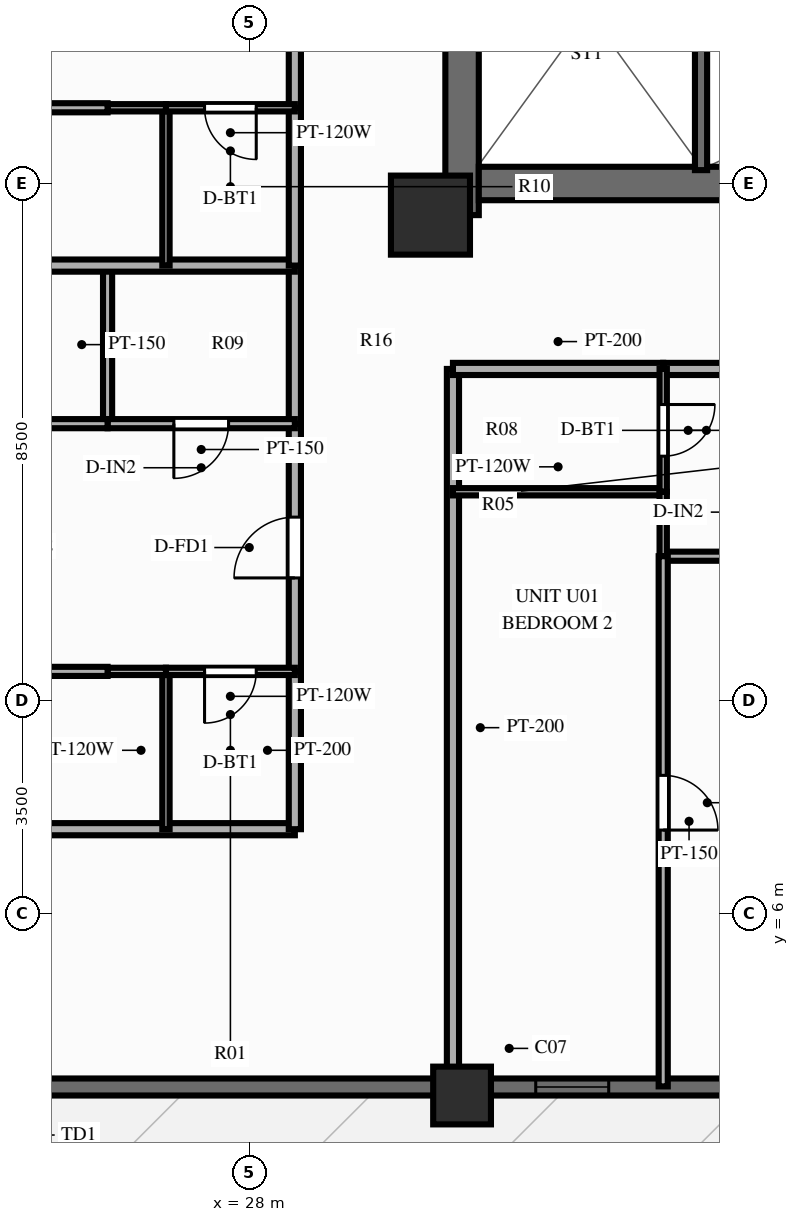
"""IFC4 building model, lengths in metres.
Left out: names, types, materials, properties, quantities, classifications, styles, units other than length and angle.
Written with IfcOpenShell. Run it as: python <this file> out.ifc"""

import sys

from ifc_helpers import new_model, si_unit, direction, frame, frame_2d, origin, origin_2d, place, context, subcontext, project, spatial, rectangle, extrude, source, transform, mapped, element, fill, save


model = new_model("IFC4")
c1 = context("Model", 3, precision=1e-05, world=origin(), true_north=direction((0.0, 1.0)))
c2 = subcontext(c1, "Body", "Model", "MODEL_VIEW")
j1 = project(units=[si_unit("LENGTHUNIT", "METRE"), si_unit("PLANEANGLEUNIT", "RADIAN")], contexts=[c1])
p1 = place(None, origin())
s1 = spatial("IfcSite", under=j1, at=p1, CompositionType="ELEMENT")
p2 = place(p1, origin())
s2 = spatial("IfcBuilding", under=s1, at=p2, CompositionType="ELEMENT")
p3 = place(p2, frame((0.0, 0.0, 119.85)))
s3 = spatial("IfcBuildingStorey", under=s2, at=p3, CompositionType="ELEMENT", Elevation=119.85)
p4 = place(p3, frame((31.5, 17.48, 0.0), z_axis=(0.0, 0.0, 1.0), x_axis=(0.0, 1.0, 0.0)))
e1 = element("IfcWall", 1, at=p4, inside=s3, PredefinedType="SHEAR", context=c2, shape_type="SweptSolid", body=[
    extrude(rectangle(XDim=19.04, YDim=0.55, at=frame_2d((9.52, 0.0))), origin(), (0.0, 0.0, 1.0), 3.0),
])
p5 = place(p4, frame((6.32, 0.0, 0.0)))
e2 = element("IfcOpeningElement", 2, at=p5, cuts=e1, PredefinedType="OPENING", context=c2, shape_type="SweptSolid", body=[
    extrude(rectangle(XDim=1.1, YDim=2.15, at=frame_2d((0.55, 1.075))), frame((0.0, 0.287, 0.0), z_axis=(0.0, -1.0, 0.0), x_axis=(1.0, 0.0, 0.0)), (0.0, 0.0, 1.0), 0.574),
])
p6 = place(p3, frame((31.775, 18.0, 0.0), z_axis=(0.0, 0.0, 1.0), x_axis=(1.0, 0.0, 0.0)))
e3 = element("IfcWall", 3, at=p6, inside=s3, PredefinedType="SHEAR", context=c2, shape_type="SweptSolid", body=[
    extrude(rectangle(XDim=12.45, YDim=0.55, at=frame_2d((6.225, 0.0))), origin(), (0.0, 0.0, 1.0), 3.0),
])
m1 = source(origin(), c2, "Body", "SweptSolid", [
    extrude(rectangle(XDim=1.3, YDim=1.3, at=origin_2d()), origin(), (0.0, 0.0, 1.0), 3.0),
])
p7 = place(p3, frame((30.98, 17.48, 0.0), z_axis=(0.0, 0.0, 1.0), x_axis=(1.0, 0.0, 0.0)))
e4 = element("IfcColumn", 4, at=p7, inside=s3, PredefinedType="COLUMN", context=c2, shape_type="MappedRepresentation", body=[
    mapped(m1, transform((0.0, 0.0, 0.0), scale=1.0)),
])
m2 = source(origin(), c2, "Body", "SweptSolid", [
    extrude(rectangle(XDim=0.95, YDim=0.95, at=origin_2d()), origin(), (0.0, 0.0, 1.0), 3.0),
])
p8 = place(p3, frame((31.5, 3.0, 0.0), z_axis=(0.0, 0.0, 1.0), x_axis=(1.0, 0.0, 0.0)))
e5 = element("IfcColumn", 5, at=p8, inside=s3, PredefinedType="COLUMN", context=c2, shape_type="MappedRepresentation", body=[
    mapped(m2, transform((0.0, 0.0, 0.0), scale=1.0)),
])
p9 = place(p3, frame((16.2, 3.14, 0.0), z_axis=(0.0, 0.0, 1.0), x_axis=(1.0, 0.0, 0.0)))
e6 = element("IfcWall", 6, at=p9, inside=s3, PredefinedType="SOLIDWALL", context=c2, shape_type="SweptSolid", body=[
    extrude(rectangle(XDim=43.6, YDim=0.28, at=frame_2d((21.8, 0.0))), origin(), (0.0, 0.0, 1.0), 2.28),
])
p10 = place(p9, frame((8.2, 0.0, 0.0), z_axis=(0.0, 0.0, 1.0), x_axis=(-1.0, 0.0, 0.0)))
e7 = element("IfcOpeningElement", 7, at=p10, cuts=e6, PredefinedType="OPENING", context=c2, shape_type="SweptSolid", body=[
    extrude(rectangle(XDim=1.1, YDim=2.15, at=frame_2d((0.55, 1.075))), frame((0.0, 0.152, 0.0), z_axis=(0.0, -1.0, 0.0), x_axis=(1.0, 0.0, 0.0)), (0.0, 0.0, 1.0), 0.304),
])
p11 = place(p9, frame((16.511, 0.0, 0.25)))
e8 = element("IfcOpeningElement", 8, at=p11, cuts=e6, PredefinedType="OPENING", context=c2, shape_type="SweptSolid", body=[
    extrude(rectangle(XDim=1.2, YDim=1.5, at=frame_2d((0.6, 0.75))), frame((0.0, 0.152, 0.0), z_axis=(0.0, -1.0, 0.0), x_axis=(1.0, 0.0, 0.0)), (0.0, 0.0, 1.0), 0.304),
])
p12 = place(p9, frame((21.065, 0.0, 0.25)))
e9 = element("IfcOpeningElement", 9, at=p12, cuts=e6, PredefinedType="OPENING", context=c2, shape_type="SweptSolid", body=[
    extrude(rectangle(XDim=1.2, YDim=1.5, at=frame_2d((0.6, 0.75))), frame((0.0, 0.152, 0.0), z_axis=(0.0, -1.0, 0.0), x_axis=(1.0, 0.0, 0.0)), (0.0, 0.0, 1.0), 0.304),
])
p13 = place(p9, frame((25.754, 0.0, 0.25)))
e10 = element("IfcOpeningElement", 10, at=p13, cuts=e6, PredefinedType="OPENING", context=c2, shape_type="SweptSolid", body=[
    extrude(rectangle(XDim=1.2, YDim=1.5, at=frame_2d((0.6, 0.75))), frame((0.0, 0.152, 0.0), z_axis=(0.0, -1.0, 0.0), x_axis=(1.0, 0.0, 0.0)), (0.0, 0.0, 1.0), 0.304),
])
p14 = place(p9, frame((35.35, 0.0, 0.25)))
e11 = element("IfcOpeningElement", 11, at=p14, cuts=e6, PredefinedType="OPENING", context=c2, shape_type="SweptSolid", body=[
    extrude(rectangle(XDim=1.2, YDim=1.5, at=frame_2d((0.6, 0.75))), frame((0.0, 0.152, 0.0), z_axis=(0.0, -1.0, 0.0), x_axis=(1.0, 0.0, 0.0)), (0.0, 0.0, 1.0), 0.304),
])
p15 = place(p3, frame((35.43, 18.22, 0.0), z_axis=(0.0, 0.0, 1.0), x_axis=(0.0, 1.0, 0.0)))
e12 = element("IfcWall", 12, at=p15, inside=s3, PredefinedType="SOLIDWALL", context=c2, shape_type="SweptSolid", body=[
    extrude(rectangle(XDim=7.22, YDim=0.2, at=frame_2d((3.61, 0.0))), origin(), (0.0, 0.0, 1.0), 2.79),
])
p16 = place(p15, frame((6.68, 0.0, 0.0), z_axis=(0.0, 0.0, 1.0), x_axis=(-1.0, 0.0, 0.0)))
e13 = element("IfcOpeningElement", 13, at=p16, cuts=e12, PredefinedType="OPENING", context=c2, shape_type="SweptSolid", body=[
    extrude(rectangle(XDim=1.1, YDim=2.15, at=frame_2d((0.55, 1.075))), frame((0.0, 0.112, 0.0), z_axis=(0.0, -1.0, 0.0), x_axis=(1.0, 0.0, 0.0)), (0.0, 0.0, 1.0), 0.224),
])
p17 = place(p3, frame((31.35, 14.95, 0.0), z_axis=(0.0, 0.0, 1.0), x_axis=(0.0, -1.0, 0.0)))
e14 = element("IfcWall", 14, at=p17, inside=s3, PredefinedType="PARTITIONING", context=c2, shape_type="SweptSolid", body=[
    extrude(rectangle(XDim=11.8, YDim=0.2, at=frame_2d((5.9, 0.0))), origin(), (0.0, 0.0, 1.0), 2.34),
])
p18 = place(p3, frame((31.35, 14.95, 0.0), z_axis=(0.0, 0.0, 1.0), x_axis=(1.0, 0.0, 0.0)))
e15 = element("IfcWall", 15, at=p18, inside=s3, PredefinedType="PARTITIONING", context=c2, shape_type="SweptSolid", body=[
    extrude(rectangle(XDim=3.458, YDim=0.2, at=frame_2d((1.729, 0.0))), origin(), (0.0, 0.0, 1.0), 2.79),
])
p19 = place(p3, frame((34.808, 14.95, 0.0), z_axis=(0.0, 0.0, 1.0), x_axis=(1.0, 0.0, 0.0)))
e16 = element("IfcWall", 16, at=p19, inside=s3, PredefinedType="PARTITIONING", context=c2, shape_type="SweptSolid", body=[
    extrude(rectangle(XDim=3.465, YDim=0.2, at=frame_2d((1.732, 0.0))), origin(), (0.0, 0.0, 1.0), 2.79),
])
p20 = place(p19, frame((1.232, 0.0, 0.0)))
e17 = element("IfcOpeningElement", 17, at=p20, cuts=e16, PredefinedType="OPENING", context=c2, shape_type="SweptSolid", body=[
    extrude(rectangle(XDim=1.0, YDim=2.15, at=frame_2d((0.5, 1.075))), frame((0.0, 0.112, 0.0), z_axis=(0.0, -1.0, 0.0), x_axis=(1.0, 0.0, 0.0)), (0.0, 0.0, 1.0), 0.224),
])
p21 = place(p3, frame((34.808, 11.87, 0.0), z_axis=(0.0, 0.0, 1.0), x_axis=(1.0, 0.0, 0.0)))
e18 = element("IfcWall", 18, at=p21, inside=s3, PredefinedType="PARTITIONING", context=c2, shape_type="SweptSolid", body=[
    extrude(rectangle(XDim=3.465, YDim=0.15, at=frame_2d((1.732, 0.0))), origin(), (0.0, 0.0, 1.0), 2.79),
])
p22 = place(p21, frame((1.282, 0.0, 0.0)))
e19 = element("IfcOpeningElement", 19, at=p22, cuts=e18, PredefinedType="OPENING", context=c2, shape_type="SweptSolid", body=[
    extrude(rectangle(XDim=0.9, YDim=2.1, at=frame_2d((0.45, 1.05))), frame((0.0, 0.087, 0.0), z_axis=(0.0, -1.0, 0.0), x_axis=(1.0, 0.0, 0.0)), (0.0, 0.0, 1.0), 0.174),
])
p23 = place(p3, frame((31.35, 12.93, 0.0), z_axis=(0.0, 0.0, 1.0), x_axis=(1.0, 0.0, 0.0)))
e20 = element("IfcWall", 20, at=p23, inside=s3, PredefinedType="PARTITIONING", context=c2, shape_type="SweptSolid", body=[
    extrude(rectangle(XDim=3.458, YDim=0.12, at=frame_2d((1.729, 0.0))), origin(), (0.0, 0.0, 1.0), 2.79),
])
p24 = place(p3, frame((34.808, 14.95, 0.0), z_axis=(0.0, 0.0, 1.0), x_axis=(0.0, -1.0, 0.0)))
e21 = element("IfcWall", 21, at=p24, inside=s3, PredefinedType="PARTITIONING", context=c2, shape_type="SweptSolid", body=[
    extrude(rectangle(XDim=2.02, YDim=0.12, at=frame_2d((1.01, 0.0))), origin(), (0.0, 0.0, 1.0), 2.79),
])
p25 = place(p24, frame((0.585, 0.0, 0.0)))
e22 = element("IfcOpeningElement", 22, at=p25, cuts=e21, PredefinedType="OPENING", context=c2, shape_type="SweptSolid", body=[
    extrude(rectangle(XDim=0.85, YDim=2.05, at=frame_2d((0.425, 1.025))), frame((0.0, 0.072, 0.0), z_axis=(0.0, -1.0, 0.0), x_axis=(1.0, 0.0, 0.0)), (0.0, 0.0, 1.0), 0.144),
])
p26 = place(p3, frame((34.808, 12.93, 0.0), z_axis=(0.0, 0.0, 1.0), x_axis=(0.0, -1.0, 0.0)))
e23 = element("IfcWall", 23, at=p26, inside=s3, PredefinedType="PARTITIONING", context=c2, shape_type="SweptSolid", body=[
    extrude(rectangle(XDim=1.06, YDim=0.12, at=frame_2d((0.53, 0.0))), origin(), (0.0, 0.0, 1.0), 2.79),
])
p27 = place(p3, frame((34.808, 11.87, 0.0), z_axis=(0.0, 0.0, 1.0), x_axis=(0.0, -1.0, 0.0)))
e24 = element("IfcWall", 24, at=p27, inside=s3, PredefinedType="PARTITIONING", context=c2, shape_type="SweptSolid", body=[
    extrude(rectangle(XDim=8.72, YDim=0.15, at=frame_2d((4.36, 0.0))), origin(), (0.0, 0.0, 1.0), 2.79),
])
p28 = place(p27, frame((3.604, 0.0, 0.0)))
e25 = element("IfcOpeningElement", 25, at=p28, cuts=e24, PredefinedType="OPENING", context=c2, shape_type="SweptSolid", body=[
    extrude(rectangle(XDim=0.9, YDim=2.1, at=frame_2d((0.45, 1.05))), frame((0.0, 0.087, 0.0), z_axis=(0.0, -1.0, 0.0), x_axis=(1.0, 0.0, 0.0)), (0.0, 0.0, 1.0), 0.174),
])
p29 = place(p3, frame((28.75, 7.38, 0.0), z_axis=(0.0, 0.0, 1.0), x_axis=(-1.0, 0.0, 0.0)))
e26 = element("IfcWall", 26, at=p29, inside=s3, PredefinedType="PARTITIONING", context=c2, shape_type="SweptSolid", body=[
    extrude(rectangle(XDim=16.6, YDim=0.2, at=frame_2d((8.3, 0.0))), origin(), (0.0, 0.0, 1.0), 2.79),
])
p30 = place(p3, frame((28.75, 7.38, 0.0), z_axis=(0.0, 0.0, 1.0), x_axis=(0.0, 1.0, 0.0)))
e27 = element("IfcWall", 27, at=p30, inside=s3, PredefinedType="PARTITIONING", context=c2, shape_type="SweptSolid", body=[
    extrude(rectangle(XDim=2.596, YDim=0.2, at=frame_2d((1.298, 0.0))), origin(), (0.0, 0.0, 1.0), 2.79),
])
p31 = place(p3, frame((28.75, 9.976, 0.0), z_axis=(0.0, 0.0, 1.0), x_axis=(0.0, 1.0, 0.0)))
e28 = element("IfcWall", 28, at=p31, inside=s3, PredefinedType="PARTITIONING", context=c2, shape_type="SweptSolid", body=[
    extrude(rectangle(XDim=4.074, YDim=0.2, at=frame_2d((2.037, 0.0))), origin(), (0.0, 0.0, 1.0), 2.79),
])
p32 = place(p31, frame((1.537, 0.0, 0.0)))
e29 = element("IfcOpeningElement", 29, at=p32, cuts=e28, PredefinedType="OPENING", context=c2, shape_type="SweptSolid", body=[
    extrude(rectangle(XDim=1.0, YDim=2.15, at=frame_2d((0.5, 1.075))), frame((0.0, 0.112, 0.0), z_axis=(0.0, -1.0, 0.0), x_axis=(1.0, 0.0, 0.0)), (0.0, 0.0, 1.0), 0.224),
])
p33 = place(p3, frame((28.75, 14.05, 0.0), z_axis=(0.0, 0.0, 1.0), x_axis=(0.0, 1.0, 0.0)))
e30 = element("IfcWall", 30, at=p33, inside=s3, PredefinedType="PARTITIONING", context=c2, shape_type="SweptSolid", body=[
    extrude(rectangle(XDim=2.6, YDim=0.2, at=frame_2d((1.3, 0.0))), origin(), (0.0, 0.0, 1.0), 2.79),
])
p34 = place(p3, frame((26.63, 7.38, 0.0), z_axis=(0.0, 0.0, 1.0), x_axis=(0.0, 1.0, 0.0)))
e31 = element("IfcWall", 31, at=p34, inside=s3, PredefinedType="PARTITIONING", context=c2, shape_type="SweptSolid", body=[
    extrude(rectangle(XDim=2.596, YDim=0.12, at=frame_2d((1.298, 0.0))), origin(), (0.0, 0.0, 1.0), 2.79),
])
p35 = place(p3, frame((25.67, 14.05, 0.0), z_axis=(0.0, 0.0, 1.0), x_axis=(0.0, 1.0, 0.0)))
e32 = element("IfcWall", 32, at=p35, inside=s3, PredefinedType="PARTITIONING", context=c2, shape_type="SweptSolid", body=[
    extrude(rectangle(XDim=2.6, YDim=0.15, at=frame_2d((1.3, 0.0))), origin(), (0.0, 0.0, 1.0), 2.79),
])
p36 = place(p3, frame((28.75, 9.976, 0.0), z_axis=(0.0, 0.0, 1.0), x_axis=(-1.0, 0.0, 0.0)))
e33 = element("IfcWall", 33, at=p36, inside=s3, PredefinedType="PARTITIONING", context=c2, shape_type="SweptSolid", body=[
    extrude(rectangle(XDim=2.12, YDim=0.12, at=frame_2d((1.06, 0.0))), origin(), (0.0, 0.0, 1.0), 2.79),
])
p37 = place(p36, frame((0.635, 0.0, 0.0)))
e34 = element("IfcOpeningElement", 34, at=p37, cuts=e33, PredefinedType="OPENING", context=c2, shape_type="SweptSolid", body=[
    extrude(rectangle(XDim=0.85, YDim=2.05, at=frame_2d((0.425, 1.025))), frame((0.0, 0.072, 0.0), z_axis=(0.0, -1.0, 0.0), x_axis=(1.0, 0.0, 0.0)), (0.0, 0.0, 1.0), 0.144),
])
p38 = place(p3, frame((26.63, 9.976, 0.0), z_axis=(0.0, 0.0, 1.0), x_axis=(-1.0, 0.0, 0.0)))
e35 = element("IfcWall", 35, at=p38, inside=s3, PredefinedType="PARTITIONING", context=c2, shape_type="SweptSolid", body=[
    extrude(rectangle(XDim=0.96, YDim=0.12, at=frame_2d((0.48, 0.0))), origin(), (0.0, 0.0, 1.0), 2.79),
])
p39 = place(p3, frame((25.67, 9.976, 0.0), z_axis=(0.0, 0.0, 1.0), x_axis=(-1.0, 0.0, 0.0)))
e36 = element("IfcWall", 36, at=p39, inside=s3, PredefinedType="PARTITIONING", context=c2, shape_type="SweptSolid", body=[
    extrude(rectangle(XDim=13.52, YDim=0.15, at=frame_2d((6.76, 0.0))), origin(), (0.0, 0.0, 1.0), 2.79),
])
p40 = place(p39, frame((5.804, 0.0, 0.0)))
e37 = element("IfcOpeningElement", 37, at=p40, cuts=e36, PredefinedType="OPENING", context=c2, shape_type="SweptSolid", body=[
    extrude(rectangle(XDim=0.9, YDim=2.1, at=frame_2d((0.45, 1.05))), frame((0.0, 0.087, 0.0), z_axis=(0.0, -1.0, 0.0), x_axis=(1.0, 0.0, 0.0)), (0.0, 0.0, 1.0), 0.174),
])
p41 = place(p3, frame((28.75, 14.05, 0.0), z_axis=(0.0, 0.0, 1.0), x_axis=(-1.0, 0.0, 0.0)))
e38 = element("IfcWall", 38, at=p41, inside=s3, PredefinedType="PARTITIONING", context=c2, shape_type="SweptSolid", body=[
    extrude(rectangle(XDim=3.08, YDim=0.15, at=frame_2d((1.54, 0.0))), origin(), (0.0, 0.0, 1.0), 2.79),
])
p42 = place(p41, frame((1.09, 0.0, 0.0)))
e39 = element("IfcOpeningElement", 39, at=p42, cuts=e38, PredefinedType="OPENING", context=c2, shape_type="SweptSolid", body=[
    extrude(rectangle(XDim=0.9, YDim=2.1, at=frame_2d((0.45, 1.05))), frame((0.0, 0.087, 0.0), z_axis=(0.0, -1.0, 0.0), x_axis=(1.0, 0.0, 0.0)), (0.0, 0.0, 1.0), 0.174),
])
p43 = place(p3, frame((25.67, 14.05, 0.0), z_axis=(0.0, 0.0, 1.0), x_axis=(-1.0, 0.0, 0.0)))
e40 = element("IfcWall", 40, at=p43, inside=s3, PredefinedType="PARTITIONING", context=c2, shape_type="SweptSolid", body=[
    extrude(rectangle(XDim=13.52, YDim=0.15, at=frame_2d((6.76, 0.0))), origin(), (0.0, 0.0, 1.0), 2.79),
])
p44 = place(p43, frame((5.804, 0.0, 0.0)))
e41 = element("IfcOpeningElement", 41, at=p44, cuts=e40, PredefinedType="OPENING", context=c2, shape_type="SweptSolid", body=[
    extrude(rectangle(XDim=0.9, YDim=2.1, at=frame_2d((0.45, 1.05))), frame((0.0, 0.087, 0.0), z_axis=(0.0, -1.0, 0.0), x_axis=(1.0, 0.0, 0.0)), (0.0, 0.0, 1.0), 0.174),
])
p45 = place(p3, frame((28.75, 16.65, 0.0), z_axis=(0.0, 0.0, 1.0), x_axis=(-1.0, 0.0, 0.0)))
e42 = element("IfcWall", 42, at=p45, inside=s3, PredefinedType="PARTITIONING", context=c2, shape_type="SweptSolid", body=[
    extrude(rectangle(XDim=16.6, YDim=0.2, at=frame_2d((8.3, 0.0))), origin(), (0.0, 0.0, 1.0), 2.79),
])
p46 = place(p3, frame((28.75, 16.65, 0.0), z_axis=(0.0, 0.0, 1.0), x_axis=(0.0, 1.0, 0.0)))
e43 = element("IfcWall", 43, at=p46, inside=s3, PredefinedType="PARTITIONING", context=c2, shape_type="SweptSolid", body=[
    extrude(rectangle(XDim=2.596, YDim=0.2, at=frame_2d((1.298, 0.0))), origin(), (0.0, 0.0, 1.0), 2.79),
])
p47 = place(p3, frame((28.75, 19.246, 0.0), z_axis=(0.0, 0.0, 1.0), x_axis=(0.0, 1.0, 0.0)))
e44 = element("IfcWall", 44, at=p47, inside=s3, PredefinedType="PARTITIONING", context=c2, shape_type="SweptSolid", body=[
    extrude(rectangle(XDim=4.074, YDim=0.2, at=frame_2d((2.037, 0.0))), origin(), (0.0, 0.0, 1.0), 2.79),
])
p48 = place(p47, frame((1.537, 0.0, 0.0)))
e45 = element("IfcOpeningElement", 45, at=p48, cuts=e44, PredefinedType="OPENING", context=c2, shape_type="SweptSolid", body=[
    extrude(rectangle(XDim=1.0, YDim=2.15, at=frame_2d((0.5, 1.075))), frame((0.0, 0.112, 0.0), z_axis=(0.0, -1.0, 0.0), x_axis=(1.0, 0.0, 0.0)), (0.0, 0.0, 1.0), 0.224),
])
p49 = place(p3, frame((26.63, 16.65, 0.0), z_axis=(0.0, 0.0, 1.0), x_axis=(0.0, 1.0, 0.0)))
e46 = element("IfcWall", 46, at=p49, inside=s3, PredefinedType="PARTITIONING", context=c2, shape_type="SweptSolid", body=[
    extrude(rectangle(XDim=2.596, YDim=0.12, at=frame_2d((1.298, 0.0))), origin(), (0.0, 0.0, 1.0), 2.79),
])
p50 = place(p3, frame((28.75, 19.246, 0.0), z_axis=(0.0, 0.0, 1.0), x_axis=(-1.0, 0.0, 0.0)))
e47 = element("IfcWall", 47, at=p50, inside=s3, PredefinedType="PARTITIONING", context=c2, shape_type="SweptSolid", body=[
    extrude(rectangle(XDim=2.12, YDim=0.12, at=frame_2d((1.06, 0.0))), origin(), (0.0, 0.0, 1.0), 2.79),
])
p51 = place(p50, frame((0.635, 0.0, 0.0)))
e48 = element("IfcOpeningElement", 48, at=p51, cuts=e47, PredefinedType="OPENING", context=c2, shape_type="SweptSolid", body=[
    extrude(rectangle(XDim=0.85, YDim=2.05, at=frame_2d((0.425, 1.025))), frame((0.0, 0.072, 0.0), z_axis=(0.0, -1.0, 0.0), x_axis=(1.0, 0.0, 0.0)), (0.0, 0.0, 1.0), 0.144),
])
p52 = place(p3, frame((26.63, 19.246, 0.0), z_axis=(0.0, 0.0, 1.0), x_axis=(-1.0, 0.0, 0.0)))
e49 = element("IfcWall", 49, at=p52, inside=s3, PredefinedType="PARTITIONING", context=c2, shape_type="SweptSolid", body=[
    extrude(rectangle(XDim=0.96, YDim=0.12, at=frame_2d((0.48, 0.0))), origin(), (0.0, 0.0, 1.0), 2.79),
])
p53 = place(p3, frame((25.67, 19.246, 0.0), z_axis=(0.0, 0.0, 1.0), x_axis=(-1.0, 0.0, 0.0)))
e50 = element("IfcWall", 50, at=p53, inside=s3, PredefinedType="PARTITIONING", context=c2, shape_type="SweptSolid", body=[
    extrude(rectangle(XDim=13.52, YDim=0.15, at=frame_2d((6.76, 0.0))), origin(), (0.0, 0.0, 1.0), 2.79),
])
p54 = place(p53, frame((5.804, 0.0, 0.0)))
e51 = element("IfcOpeningElement", 51, at=p54, cuts=e50, PredefinedType="OPENING", context=c2, shape_type="SweptSolid", body=[
    extrude(rectangle(XDim=0.9, YDim=2.1, at=frame_2d((0.45, 1.05))), frame((0.0, 0.087, 0.0), z_axis=(0.0, -1.0, 0.0), x_axis=(1.0, 0.0, 0.0)), (0.0, 0.0, 1.0), 0.174),
])
m3 = source(origin(), c2, "Body", "SweptSolid", [
    extrude(rectangle(XDim=1.2, YDim=1.5, at=frame_2d((0.6, 0.75))), frame((0.0, 0.03, 0.0), z_axis=(0.0, -1.0, 0.0), x_axis=(1.0, 0.0, 0.0)), (0.0, 0.0, 1.0), 0.06),
])
p55 = place(p11, origin())
e52 = element("IfcWindow", 52, at=p55, inside=s3, PartitioningType="SINGLE_PANEL", PredefinedType="WINDOW", context=c2, shape_type="MappedRepresentation", body=[
    mapped(m3, transform((0.0, 0.0, 0.0), scale=1.0)),
])
fill(e8, e52)
m4 = source(origin(), c2, "Body", "SweptSolid", [
    extrude(rectangle(XDim=0.85, YDim=2.05, at=frame_2d((0.425, 1.025))), frame((0.0, 0.025, 0.0), z_axis=(0.0, -1.0, 0.0), x_axis=(1.0, 0.0, 0.0)), (0.0, 0.0, 1.0), 0.05),
])
p56 = place(p25, origin())
e53 = element("IfcDoor", 53, at=p56, inside=s3, OperationType="SINGLE_SWING_LEFT", PredefinedType="DOOR", context=c2, shape_type="MappedRepresentation", body=[
    mapped(m4, transform((0.0, 0.0, 0.0), scale=1.0)),
])
fill(e22, e53)
m5 = source(origin(), c2, "Body", "SweptSolid", [
    extrude(rectangle(XDim=0.9, YDim=2.1, at=frame_2d((0.45, 1.05))), frame((0.0, 0.025, 0.0), z_axis=(0.0, -1.0, 0.0), x_axis=(1.0, 0.0, 0.0)), (0.0, 0.0, 1.0), 0.05),
])
p57 = place(p28, origin())
e54 = element("IfcDoor", 54, at=p57, inside=s3, OperationType="SINGLE_SWING_RIGHT", PredefinedType="DOOR", context=c2, shape_type="MappedRepresentation", body=[
    mapped(m5, transform((0.0, 0.0, 0.0), scale=1.0)),
])
fill(e25, e54)
m6 = source(origin(), c2, "Body", "SweptSolid", [
    extrude(rectangle(XDim=1.0, YDim=2.15, at=frame_2d((0.5, 1.075))), frame((0.0, 0.025, 0.0), z_axis=(0.0, -1.0, 0.0), x_axis=(1.0, 0.0, 0.0)), (0.0, 0.0, 1.0), 0.05),
])
p58 = place(p32, origin())
e55 = element("IfcDoor", 55, at=p58, inside=s3, OperationType="SINGLE_SWING_LEFT", PredefinedType="DOOR", context=c2, shape_type="MappedRepresentation", body=[
    mapped(m6, transform((0.0, 0.0, 0.0), scale=1.0)),
])
fill(e29, e55)
p59 = place(p37, origin())
e56 = element("IfcDoor", 56, at=p59, inside=s3, OperationType="SINGLE_SWING_RIGHT", PredefinedType="DOOR", context=c2, shape_type="MappedRepresentation", body=[
    mapped(m4, transform((0.0, 0.0, 0.0), scale=1.0)),
])
fill(e34, e56)
p60 = place(p42, origin())
e57 = element("IfcDoor", 57, at=p60, inside=s3, OperationType="SINGLE_SWING_RIGHT", PredefinedType="DOOR", context=c2, shape_type="MappedRepresentation", body=[
    mapped(m5, transform((0.0, 0.0, 0.0), scale=1.0)),
])
fill(e39, e57)
p61 = place(p51, origin())
e58 = element("IfcDoor", 58, at=p61, inside=s3, OperationType="SINGLE_SWING_LEFT", PredefinedType="DOOR", context=c2, shape_type="MappedRepresentation", body=[
    mapped(m4, transform((0.0, 0.0, 0.0), scale=1.0)),
])
fill(e48, e58)
save(model, sys.argv[1])
